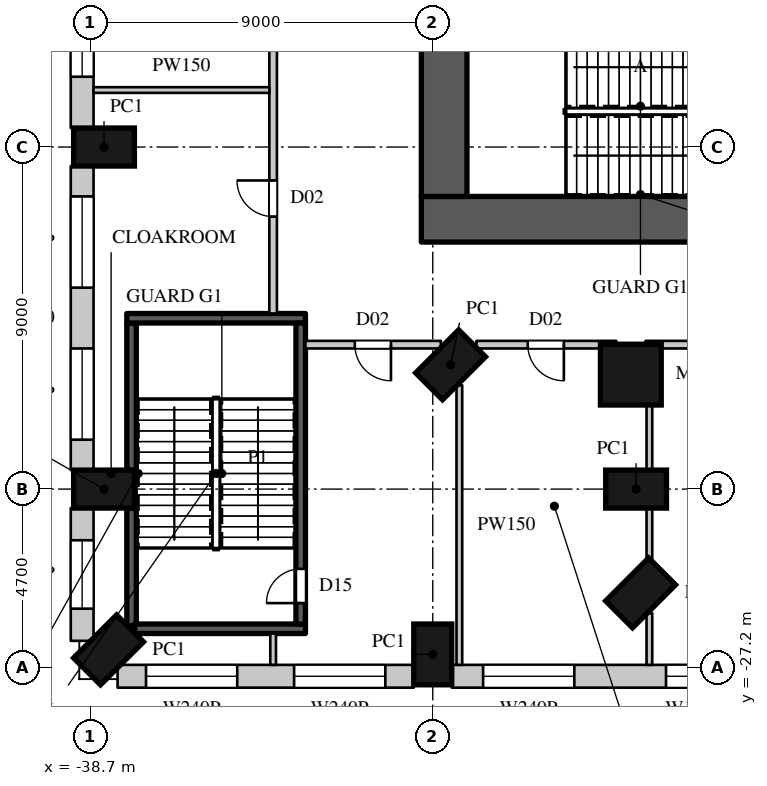
"""IFC4 building model, lengths in metres.
Left out: names, types, materials, properties, quantities, classifications, styles, units other than length and angle.
Written with IfcOpenShell. Run it as: python <this file> out.ifc"""

import sys

from ifc_helpers import new_model, si_unit, direction, frame, frame_2d, origin, origin_2d, place, context, subcontext, project, spatial, rectangle, circle, extrude, element, fill, save


model = new_model("IFC4")
c1 = context("Model", 3, precision=1e-05, world=origin(), true_north=direction((0.0, 1.0)))
c2 = subcontext(c1, "Body", "Model", "MODEL_VIEW")
j1 = project(units=[si_unit("LENGTHUNIT", "METRE"), si_unit("PLANEANGLEUNIT", "RADIAN")], contexts=[c1])
p1 = place(None, origin())
s1 = spatial("IfcSite", under=j1, at=p1, CompositionType="ELEMENT")
p2 = place(p1, origin())
s2 = spatial("IfcBuilding", under=s1, at=p2, CompositionType="ELEMENT")
p3 = place(p2, frame((0.0, 0.0, 19.0)))
s3 = spatial("IfcBuildingStorey", under=s2, at=p3, CompositionType="ELEMENT", Elevation=19.0)
p4 = place(p3, frame((-29.231, -19.231, 0.0), z_axis=(0.0, 0.0, 1.0), x_axis=(0.707106781187, -0.707106781187, 0.0)))
e1 = element("IfcColumn", 1, at=p4, inside=s3, PredefinedType="COLUMN", context=c2, shape_type="SweptSolid", body=[
    extrude(rectangle(XDim=1.0, YDim=1.6, at=origin_2d()), origin(), (0.0, 0.0, 1.0), 10.0),
])
p5 = place(p3, frame((-24.488, -19.488, 0.0), z_axis=(0.0, 0.0, 1.0), x_axis=(1.0, 0.0, 0.0)))
e2 = element("IfcColumn", 2, at=p5, inside=s3, PredefinedType="COLUMN", context=c2, shape_type="SweptSolid", body=[
    extrude(circle(Radius=0.8, at=origin_2d()), origin(), (0.0, 0.0, 1.0), 10.0),
])
for number, where, z_axis, x_axis in (
    (3, (-24.35, -22.5, 0.0), (0.0, 0.0, 1.0), (0.0, -1.0, 0.0)),
    (4, (-24.231, -25.231, 0.0), (0.0, 0.0, 1.0), (0.707, -0.707, 0.0)),
    (5, (-38.231, -26.731, 0.0), (0.0, 0.0, 1.0), (0.707, -0.707, 0.0)),
    (6, (-29.7, -26.85, 0.0), (0.0, 0.0, 1.0), (1.0, 0.0, 0.0)),
    (7, (-38.35, -13.5, 0.0), (0.0, 0.0, 1.0), (0.0, -1.0, 0.0)),
    (8, (-38.35, -22.5, 0.0), (0.0, 0.0, 1.0), (0.0, -1.0, 0.0)),
):
    element("IfcColumn", number, at=place(p3, frame(where, z_axis=z_axis, x_axis=x_axis)), inside=s3, PredefinedType="COLUMN", context=c2, shape_type="SweptSolid", body=[
        extrude(rectangle(XDim=1.0, YDim=1.6, at=origin_2d()), origin(), (0.0, 0.0, 1.0), 10.0),
    ])
p6 = place(p3, frame((-37.993, -27.425, 0.0), z_axis=(0.0, 0.0, 1.0), x_axis=(1.0, 0.0, 0.0)))
e9 = element("IfcWall", 9, at=p6, inside=s3, PredefinedType="ELEMENTEDWALL", context=c2, shape_type="SweptSolid", body=[
    extrude(rectangle(XDim=7.793, YDim=0.6, at=frame_2d((3.896, 0.0))), origin(), (0.0, 0.0, 1.0), 9.6),
])
p7 = place(p6, frame((0.748, 0.0, 3.0)))
e10 = element("IfcOpeningElement", 10, at=p7, cuts=e9, PredefinedType="OPENING", context=c2, shape_type="SweptSolid", body=[
    extrude(rectangle(XDim=2.4, YDim=2.4, at=frame_2d((1.2, 1.2))), frame((0.0, 0.31, 0.0), z_axis=(0.0, -1.0, 0.0), x_axis=(1.0, 0.0, 0.0)), (0.0, 0.0, 1.0), 0.62),
])
p8 = place(p6, frame((4.645, 0.0, 3.0)))
e11 = element("IfcOpeningElement", 11, at=p8, cuts=e9, PredefinedType="OPENING", context=c2, shape_type="SweptSolid", body=[
    extrude(rectangle(XDim=2.4, YDim=2.4, at=frame_2d((1.2, 1.2))), frame((0.0, 0.31, 0.0), z_axis=(0.0, -1.0, 0.0), x_axis=(1.0, 0.0, 0.0)), (0.0, 0.0, 1.0), 0.62),
])
p9 = place(p3, frame((-29.2, -27.425, 0.0), z_axis=(0.0, 0.0, 1.0), x_axis=(1.0, 0.0, 0.0)))
e12 = element("IfcWall", 12, at=p9, inside=s3, PredefinedType="ELEMENTEDWALL", context=c2, shape_type="SweptSolid", body=[
    extrude(rectangle(XDim=16.2, YDim=0.6, at=frame_2d((8.1, 0.0))), origin(), (0.0, 0.0, 1.0), 9.6),
])
p10 = place(p9, frame((0.825, 0.0, 3.0)))
e13 = element("IfcOpeningElement", 13, at=p10, cuts=e12, PredefinedType="OPENING", context=c2, shape_type="SweptSolid", body=[
    extrude(rectangle(XDim=2.4, YDim=2.4, at=frame_2d((1.2, 1.2))), frame((0.0, 0.31, 0.0), z_axis=(0.0, -1.0, 0.0), x_axis=(1.0, 0.0, 0.0)), (0.0, 0.0, 1.0), 0.62),
])
p11 = place(p9, frame((8.925, 0.0, 3.0)))
e14 = element("IfcOpeningElement", 14, at=p11, cuts=e12, PredefinedType="OPENING", context=c2, shape_type="SweptSolid", body=[
    extrude(rectangle(XDim=2.4, YDim=2.4, at=frame_2d((1.2, 1.2))), frame((0.0, 0.31, 0.0), z_axis=(0.0, -1.0, 0.0), x_axis=(1.0, 0.0, 0.0)), (0.0, 0.0, 1.0), 0.62),
])
p12 = place(p9, frame((12.975, 0.0, 3.0)))
e15 = element("IfcOpeningElement", 15, at=p12, cuts=e12, PredefinedType="OPENING", context=c2, shape_type="SweptSolid", body=[
    extrude(rectangle(XDim=2.4, YDim=2.4, at=frame_2d((1.2, 1.2))), frame((0.0, 0.31, 0.0), z_axis=(0.0, -1.0, 0.0), x_axis=(1.0, 0.0, 0.0)), (0.0, 0.0, 1.0), 0.62),
])
p13 = place(p9, frame((5.637, 0.0, 3.0)))
e16 = element("IfcOpeningElement", 16, at=p13, cuts=e12, PredefinedType="OPENING", context=c2, shape_type="SweptSolid", body=[
    extrude(rectangle(XDim=1.5, YDim=2.4, at=frame_2d((0.75, 1.2))), frame((0.0, 0.31, 0.0), z_axis=(0.0, -1.0, 0.0), x_axis=(1.0, 0.0, 0.0)), (0.0, 0.0, 1.0), 0.62),
])
p14 = place(p3, frame((-38.925, -5.0, 0.0), z_axis=(0.0, 0.0, 1.0), x_axis=(0.0, -1.0, 0.0)))
e17 = element("IfcWall", 17, at=p14, inside=s3, PredefinedType="ELEMENTEDWALL", context=c2, shape_type="SweptSolid", body=[
    extrude(rectangle(XDim=8.0, YDim=0.6, at=frame_2d((4.0, 0.0))), origin(), (0.0, 0.0, 1.0), 9.6),
])
p15 = place(p14, frame((0.8, 0.0, 3.0)))
e18 = element("IfcOpeningElement", 18, at=p15, cuts=e17, PredefinedType="OPENING", context=c2, shape_type="SweptSolid", body=[
    extrude(rectangle(XDim=2.4, YDim=2.4, at=frame_2d((1.2, 1.2))), frame((0.0, 0.31, 0.0), z_axis=(0.0, -1.0, 0.0), x_axis=(1.0, 0.0, 0.0)), (0.0, 0.0, 1.0), 0.62),
])
p16 = place(p14, frame((4.85, 0.0, 3.0)))
e19 = element("IfcOpeningElement", 19, at=p16, cuts=e17, PredefinedType="OPENING", context=c2, shape_type="SweptSolid", body=[
    extrude(rectangle(XDim=1.8, YDim=2.4, at=frame_2d((0.9, 1.2))), frame((0.0, 0.31, 0.0), z_axis=(0.0, -1.0, 0.0), x_axis=(1.0, 0.0, 0.0)), (0.0, 0.0, 1.0), 0.62),
])
p17 = place(p3, frame((-38.925, -14.0, 0.0), z_axis=(0.0, 0.0, 1.0), x_axis=(0.0, -1.0, 0.0)))
e20 = element("IfcWall", 20, at=p17, inside=s3, PredefinedType="ELEMENTEDWALL", context=c2, shape_type="SweptSolid", body=[
    extrude(rectangle(XDim=8.0, YDim=0.6, at=frame_2d((4.0, 0.0))), origin(), (0.0, 0.0, 1.0), 9.6),
])
p18 = place(p17, frame((0.8, 0.0, 3.0)))
e21 = element("IfcOpeningElement", 21, at=p18, cuts=e20, PredefinedType="OPENING", context=c2, shape_type="SweptSolid", body=[
    extrude(rectangle(XDim=2.4, YDim=2.4, at=frame_2d((1.2, 1.2))), frame((0.0, 0.31, 0.0), z_axis=(0.0, -1.0, 0.0), x_axis=(1.0, 0.0, 0.0)), (0.0, 0.0, 1.0), 0.62),
])
p19 = place(p17, frame((4.8, 0.0, 3.0)))
e22 = element("IfcOpeningElement", 22, at=p19, cuts=e20, PredefinedType="OPENING", context=c2, shape_type="SweptSolid", body=[
    extrude(rectangle(XDim=2.4, YDim=2.4, at=frame_2d((1.2, 1.2))), frame((0.0, 0.31, 0.0), z_axis=(0.0, -1.0, 0.0), x_axis=(1.0, 0.0, 0.0)), (0.0, 0.0, 1.0), 0.62),
])
p20 = place(p3, frame((-38.925, -23.0, 0.0), z_axis=(0.0, 0.0, 1.0), x_axis=(0.0, -1.0, 0.0)))
e23 = element("IfcWall", 23, at=p20, inside=s3, PredefinedType="ELEMENTEDWALL", context=c2, shape_type="SweptSolid", body=[
    extrude(rectangle(XDim=3.493, YDim=0.6, at=frame_2d((1.747, 0.0))), origin(), (0.0, 0.0, 1.0), 9.6),
])
p21 = place(p20, frame((0.846, 0.0, 3.0)))
e24 = element("IfcOpeningElement", 24, at=p21, cuts=e23, PredefinedType="OPENING", context=c2, shape_type="SweptSolid", body=[
    extrude(rectangle(XDim=1.8, YDim=2.4, at=frame_2d((0.9, 1.2))), frame((0.0, 0.31, 0.0), z_axis=(0.0, -1.0, 0.0), x_axis=(1.0, 0.0, 0.0)), (0.0, 0.0, 1.0), 0.62),
])
p22 = place(p3, frame((-30.0, -15.4, 0.0), z_axis=(0.0, 0.0, 1.0), x_axis=(1.0, 0.0, 0.0)))
e25 = element("IfcWall", 25, at=p22, inside=s3, PredefinedType="SHEAR", context=c2, shape_type="SweptSolid", body=[
    extrude(rectangle(XDim=16.0, YDim=1.2, at=frame_2d((8.0, 0.0))), origin(), (0.0, 0.0, 1.0), 10.0),
])
p23 = place(p3, frame((-29.4, -14.8, 0.0), z_axis=(0.0, 0.0, 1.0), x_axis=(0.0, 1.0, 0.0)))
e26 = element("IfcWall", 26, at=p23, inside=s3, PredefinedType="SHEAR", context=c2, shape_type="SweptSolid", body=[
    extrude(rectangle(XDim=4.6, YDim=1.2, at=frame_2d((2.3, 0.0))), origin(), (0.0, 0.0, 1.0), 10.0),
])
p24 = place(p3, frame((-33.9, -17.88, 0.0), z_axis=(0.0, 0.0, 1.0), x_axis=(0.0, 1.0, 0.0)))
e27 = element("IfcWall", 27, at=p24, inside=s3, PredefinedType="PARTITIONING", context=c2, shape_type="SweptSolid", body=[
    extrude(rectangle(XDim=35.76, YDim=0.2, at=frame_2d((17.88, 0.0))), origin(), (0.0, 0.0, 1.0), 9.598),
])
p25 = place(p24, frame((2.55, 0.0, 0.0)))
e28 = element("IfcOpeningElement", 28, at=p25, cuts=e27, PredefinedType="OPENING", context=c2, shape_type="SweptSolid", body=[
    extrude(rectangle(XDim=0.95, YDim=2.2, at=frame_2d((0.475, 1.1))), frame((0.0, 0.11, 0.0), z_axis=(0.0, -1.0, 0.0), x_axis=(1.0, 0.0, 0.0)), (0.0, 0.0, 1.0), 0.22),
])
p26 = place(p24, frame((12.9, 0.0, 0.0)))
e29 = element("IfcOpeningElement", 29, at=p26, cuts=e27, PredefinedType="OPENING", context=c2, shape_type="SweptSolid", body=[
    extrude(rectangle(XDim=0.95, YDim=2.2, at=frame_2d((0.475, 1.1))), frame((0.0, 0.11, 0.0), z_axis=(0.0, -1.0, 0.0), x_axis=(1.0, 0.0, 0.0)), (0.0, 0.0, 1.0), 0.22),
])
p27 = place(p24, frame((27.75, 0.0, 0.0)))
e30 = element("IfcOpeningElement", 30, at=p27, cuts=e27, PredefinedType="OPENING", context=c2, shape_type="SweptSolid", body=[
    extrude(rectangle(XDim=0.95, YDim=2.2, at=frame_2d((0.475, 1.1))), frame((0.0, 0.11, 0.0), z_axis=(0.0, -1.0, 0.0), x_axis=(1.0, 0.0, 0.0)), (0.0, 0.0, 1.0), 0.22),
])
p28 = place(p3, frame((-33.05, -18.7, 0.0), z_axis=(0.0, 0.0, 1.0), x_axis=(1.0, 0.0, 0.0)))
e31 = element("IfcWall", 31, at=p28, inside=s3, PredefinedType="PARTITIONING", context=c2, shape_type="SweptSolid", body=[
    extrude(rectangle(XDim=3.563, YDim=0.2, at=frame_2d((1.781, 0.0))), origin(), (0.0, 0.0, 1.0), 9.598),
])
p29 = place(p28, frame((1.3, 0.0, 0.0)))
e32 = element("IfcOpeningElement", 32, at=p29, cuts=e31, PredefinedType="OPENING", context=c2, shape_type="SweptSolid", body=[
    extrude(rectangle(XDim=0.95, YDim=2.2, at=frame_2d((0.475, 1.1))), frame((0.0, 0.11, 0.0), z_axis=(0.0, -1.0, 0.0), x_axis=(1.0, 0.0, 0.0)), (0.0, 0.0, 1.0), 0.22),
])
p30 = place(p3, frame((-28.55, -18.7, 0.0), z_axis=(0.0, 0.0, 1.0), x_axis=(1.0, 0.0, 0.0)))
e33 = element("IfcWall", 33, at=p30, inside=s3, PredefinedType="PARTITIONING", context=c2, shape_type="SweptSolid", body=[
    extrude(rectangle(XDim=3.679, YDim=0.2, at=frame_2d((1.839, 0.0))), origin(), (0.0, 0.0, 1.0), 9.598),
])
p31 = place(p30, frame((1.35, 0.0, 0.0)))
e34 = element("IfcOpeningElement", 34, at=p31, cuts=e33, PredefinedType="OPENING", context=c2, shape_type="SweptSolid", body=[
    extrude(rectangle(XDim=0.95, YDim=2.2, at=frame_2d((0.475, 1.1))), frame((0.0, 0.11, 0.0), z_axis=(0.0, -1.0, 0.0), x_axis=(1.0, 0.0, 0.0)), (0.0, 0.0, 1.0), 0.22),
])
p32 = place(p3, frame((-24.105, -18.7, 0.0), z_axis=(0.0, 0.0, 1.0), x_axis=(1.0, 0.0, 0.0)))
e35 = element("IfcWall", 35, at=p32, inside=s3, PredefinedType="PARTITIONING", context=c2, shape_type="SweptSolid", body=[
    extrude(rectangle(XDim=13.505, YDim=0.2, at=frame_2d((6.752, 0.0))), origin(), (0.0, 0.0, 1.0), 9.598),
])
p33 = place(p32, frame((4.0, 0.0, 0.0)))
e36 = element("IfcOpeningElement", 36, at=p33, cuts=e35, PredefinedType="OPENING", context=c2, shape_type="SweptSolid", body=[
    extrude(rectangle(XDim=0.95, YDim=2.2, at=frame_2d((0.475, 1.1))), frame((0.0, 0.11, 0.0), z_axis=(0.0, -1.0, 0.0), x_axis=(1.0, 0.0, 0.0)), (0.0, 0.0, 1.0), 0.22),
])
p34 = place(p32, frame((9.75, 0.0, 0.0)))
e37 = element("IfcOpeningElement", 37, at=p34, cuts=e35, PredefinedType="OPENING", context=c2, shape_type="SweptSolid", body=[
    extrude(rectangle(XDim=0.95, YDim=2.2, at=frame_2d((0.475, 1.1))), frame((0.0, 0.11, 0.0), z_axis=(0.0, -1.0, 0.0), x_axis=(1.0, 0.0, 0.0)), (0.0, 0.0, 1.0), 0.22),
])
p35 = place(p3, frame((-38.625, -12.0, 0.0), z_axis=(0.0, 0.0, 1.0), x_axis=(1.0, 0.0, 0.0)))
e38 = element("IfcWall", 38, at=p35, inside=s3, PredefinedType="PARTITIONING", context=c2, shape_type="SweptSolid", body=[
    extrude(rectangle(XDim=4.625, YDim=0.15, at=frame_2d((2.312, 0.0))), origin(), (0.0, 0.0, 1.0), 9.598),
])
p36 = place(p3, frame((-33.9, -27.125, 0.0), z_axis=(0.0, 0.0, 1.0), x_axis=(0.0, 1.0, 0.0)))
e39 = element("IfcWall", 39, at=p36, inside=s3, PredefinedType="PARTITIONING", context=c2, shape_type="SweptSolid", body=[
    extrude(rectangle(XDim=0.825, YDim=0.15, at=frame_2d((0.413, 0.0))), origin(), (0.0, 0.0, 1.0), 9.598),
])
p37 = place(p3, frame((-29.0, -27.125, 0.0), z_axis=(0.0, 0.0, 1.0), x_axis=(0.0, 1.0, 0.0)))
e40 = element("IfcWall", 40, at=p37, inside=s3, PredefinedType="PARTITIONING", context=c2, shape_type="SweptSolid", body=[
    extrude(rectangle(XDim=7.358, YDim=0.15, at=frame_2d((3.679, 0.0))), origin(), (0.0, 0.0, 1.0), 9.598),
])
p38 = place(p3, frame((-24.0, -27.125, 0.0), z_axis=(0.0, 0.0, 1.0), x_axis=(0.0, 1.0, 0.0)))
e41 = element("IfcWall", 41, at=p38, inside=s3, PredefinedType="PARTITIONING", context=c2, shape_type="SweptSolid", body=[
    extrude(rectangle(XDim=1.358, YDim=0.15, at=frame_2d((0.679, 0.0))), origin(), (0.0, 0.0, 1.0), 9.598),
])
p39 = place(p3, frame((-24.0, -24.32, 0.0), z_axis=(0.0, 0.0, 1.0), x_axis=(0.0, 1.0, 0.0)))
e42 = element("IfcWall", 42, at=p39, inside=s3, PredefinedType="PARTITIONING", context=c2, shape_type="SweptSolid", body=[
    extrude(rectangle(XDim=1.32, YDim=0.15, at=frame_2d((0.66, 0.0))), origin(), (0.0, 0.0, 1.0), 9.598),
])
p40 = place(p3, frame((-24.0, -22.0, 0.0), z_axis=(0.0, 0.0, 1.0), x_axis=(0.0, 1.0, 0.0)))
e43 = element("IfcWall", 43, at=p40, inside=s3, PredefinedType="PARTITIONING", context=c2, shape_type="SweptSolid", body=[
    extrude(rectangle(XDim=1.843, YDim=0.15, at=frame_2d((0.921, 0.0))), origin(), (0.0, 0.0, 1.0), 9.598),
])
p41 = place(p3, frame((-37.625, -26.095, 0.0), z_axis=(0.0, 0.0, 1.0), x_axis=(0.0, 1.0, 0.0)))
e44 = element("IfcWall", 44, at=p41, inside=s3, PredefinedType="SHEAR", context=c2, shape_type="SweptSolid", body=[
    extrude(rectangle(XDim=3.095, YDim=0.25, at=frame_2d((1.548, 0.0))), origin(), (0.0, 0.0, 1.0), 9.6),
])
p42 = place(p3, frame((-37.625, -22.0, 0.0), z_axis=(0.0, 0.0, 1.0), x_axis=(0.0, 1.0, 0.0)))
e45 = element("IfcWall", 45, at=p42, inside=s3, PredefinedType="SHEAR", context=c2, shape_type="SweptSolid", body=[
    extrude(rectangle(XDim=3.87, YDim=0.25, at=frame_2d((1.935, 0.0))), origin(), (0.0, 0.0, 1.0), 9.6),
])
p43 = place(p3, frame((-37.545, -26.175, 0.0), z_axis=(0.0, 0.0, 1.0), x_axis=(1.0, 0.0, 0.0)))
e46 = element("IfcWall", 46, at=p43, inside=s3, PredefinedType="SHEAR", context=c2, shape_type="SweptSolid", body=[
    extrude(rectangle(XDim=4.495, YDim=0.25, at=frame_2d((2.248, 0.0))), origin(), (0.0, 0.0, 1.0), 9.6),
])
p44 = place(p3, frame((-37.75, -18.005, 0.0), z_axis=(0.0, 0.0, 1.0), x_axis=(1.0, 0.0, 0.0)))
e47 = element("IfcWall", 47, at=p44, inside=s3, PredefinedType="SHEAR", context=c2, shape_type="SweptSolid", body=[
    extrude(rectangle(XDim=4.7, YDim=0.25, at=frame_2d((2.35, 0.0))), origin(), (0.0, 0.0, 1.0), 9.6),
])
p45 = place(p3, frame((-33.175, -26.05, 0.0), z_axis=(0.0, 0.0, 1.0), x_axis=(0.0, 1.0, 0.0)))
e48 = element("IfcWall", 48, at=p45, inside=s3, PredefinedType="SHEAR", context=c2, shape_type="SweptSolid", body=[
    extrude(rectangle(XDim=7.92, YDim=0.25, at=frame_2d((3.96, 0.0))), origin(), (0.0, 0.0, 1.0), 9.6),
])
p46 = place(p45, frame((0.55, 0.0, 0.0)))
e49 = element("IfcOpeningElement", 49, at=p46, cuts=e48, PredefinedType="OPENING", context=c2, shape_type="SweptSolid", body=[
    extrude(rectangle(XDim=0.9, YDim=2.2, at=frame_2d((0.45, 1.1))), frame((0.0, 0.135, 0.0), z_axis=(0.0, -1.0, 0.0), x_axis=(1.0, 0.0, 0.0)), (0.0, 0.0, 1.0), 0.27),
])
p47 = place(p7, origin())
e50 = element("IfcWindow", 50, at=p47, inside=s3, PartitioningType="SINGLE_PANEL", PredefinedType="WINDOW", context=c2, shape_type="SweptSolid", body=[
    extrude(rectangle(XDim=2.4, YDim=2.4, at=frame_2d((1.2, 1.2))), frame((0.0, 0.06, 0.0), z_axis=(0.0, -1.0, 0.0), x_axis=(1.0, 0.0, 0.0)), (0.0, 0.0, 1.0), 0.06),
])
fill(e10, e50)
p48 = place(p8, origin())
e51 = element("IfcWindow", 51, at=p48, inside=s3, PartitioningType="SINGLE_PANEL", PredefinedType="WINDOW", context=c2, shape_type="SweptSolid", body=[
    extrude(rectangle(XDim=2.4, YDim=2.4, at=frame_2d((1.2, 1.2))), frame((0.0, 0.06, 0.0), z_axis=(0.0, -1.0, 0.0), x_axis=(1.0, 0.0, 0.0)), (0.0, 0.0, 1.0), 0.06),
])
fill(e11, e51)
p49 = place(p10, origin())
e52 = element("IfcWindow", 52, at=p49, inside=s3, PartitioningType="SINGLE_PANEL", PredefinedType="WINDOW", context=c2, shape_type="SweptSolid", body=[
    extrude(rectangle(XDim=2.4, YDim=2.4, at=frame_2d((1.2, 1.2))), frame((0.0, 0.06, 0.0), z_axis=(0.0, -1.0, 0.0), x_axis=(1.0, 0.0, 0.0)), (0.0, 0.0, 1.0), 0.06),
])
fill(e13, e52)
p50 = place(p18, origin())
e53 = element("IfcWindow", 53, at=p50, inside=s3, PartitioningType="SINGLE_PANEL", PredefinedType="WINDOW", context=c2, shape_type="SweptSolid", body=[
    extrude(rectangle(XDim=2.4, YDim=2.4, at=frame_2d((1.2, 1.2))), frame((0.0, 0.06, 0.0), z_axis=(0.0, -1.0, 0.0), x_axis=(1.0, 0.0, 0.0)), (0.0, 0.0, 1.0), 0.06),
])
fill(e21, e53)
p51 = place(p19, origin())
e54 = element("IfcWindow", 54, at=p51, inside=s3, PartitioningType="SINGLE_PANEL", PredefinedType="WINDOW", context=c2, shape_type="SweptSolid", body=[
    extrude(rectangle(XDim=2.4, YDim=2.4, at=frame_2d((1.2, 1.2))), frame((0.0, 0.06, 0.0), z_axis=(0.0, -1.0, 0.0), x_axis=(1.0, 0.0, 0.0)), (0.0, 0.0, 1.0), 0.06),
])
fill(e22, e54)
p52 = place(p21, origin())
e55 = element("IfcWindow", 55, at=p52, inside=s3, PartitioningType="SINGLE_PANEL", PredefinedType="WINDOW", context=c2, shape_type="SweptSolid", body=[
    extrude(rectangle(XDim=1.8, YDim=2.4, at=frame_2d((0.9, 1.2))), frame((0.0, 0.06, 0.0), z_axis=(0.0, -1.0, 0.0), x_axis=(1.0, 0.0, 0.0)), (0.0, 0.0, 1.0), 0.06),
])
fill(e24, e55)
p53 = place(p29, origin())
e56 = element("IfcDoor", 56, at=p53, inside=s3, OperationType="SINGLE_SWING_LEFT", PredefinedType="DOOR", context=c2, shape_type="SweptSolid", body=[
    extrude(rectangle(XDim=0.95, YDim=2.2, at=frame_2d((0.475, 1.1))), frame((0.0, 0.025, 0.0), z_axis=(0.0, -1.0, 0.0), x_axis=(1.0, 0.0, 0.0)), (0.0, 0.0, 1.0), 0.05),
])
fill(e32, e56)
p54 = place(p31, origin())
e57 = element("IfcDoor", 57, at=p54, inside=s3, OperationType="SINGLE_SWING_LEFT", PredefinedType="DOOR", context=c2, shape_type="SweptSolid", body=[
    extrude(rectangle(XDim=0.95, YDim=2.2, at=frame_2d((0.475, 1.1))), frame((0.0, 0.025, 0.0), z_axis=(0.0, -1.0, 0.0), x_axis=(1.0, 0.0, 0.0)), (0.0, 0.0, 1.0), 0.05),
])
fill(e34, e57)
p55 = place(p25, origin())
e58 = element("IfcDoor", 58, at=p55, inside=s3, OperationType="SINGLE_SWING_RIGHT", PredefinedType="DOOR", context=c2, shape_type="SweptSolid", body=[
    extrude(rectangle(XDim=0.95, YDim=2.2, at=frame_2d((0.475, 1.1))), frame((0.0, 0.025, 0.0), z_axis=(0.0, -1.0, 0.0), x_axis=(1.0, 0.0, 0.0)), (0.0, 0.0, 1.0), 0.05),
])
fill(e28, e58)
p56 = place(p46, origin())
e59 = element("IfcDoor", 59, at=p56, inside=s3, OperationType="SINGLE_SWING_LEFT", PredefinedType="DOOR", context=c2, shape_type="SweptSolid", body=[
    extrude(rectangle(XDim=0.9, YDim=2.2, at=frame_2d((0.45, 1.1))), frame((0.0, 0.025, 0.0), z_axis=(0.0, -1.0, 0.0), x_axis=(1.0, 0.0, 0.0)), (0.0, 0.0, 1.0), 0.05),
])
fill(e49, e59)
p57 = place(p13, origin())
e60 = element("IfcWindow", 60, at=p57, inside=s3, PartitioningType="SINGLE_PANEL", PredefinedType="WINDOW", context=c2, shape_type="SweptSolid", body=[
    extrude(rectangle(XDim=1.5, YDim=2.4, at=frame_2d((0.75, 1.2))), frame((0.0, 0.06, 0.0), z_axis=(0.0, -1.0, 0.0), x_axis=(1.0, 0.0, 0.0)), (0.0, 0.0, 1.0), 0.06),
])
fill(e16, e60)
p58 = place(p16, origin())
e61 = element("IfcWindow", 61, at=p58, inside=s3, PartitioningType="SINGLE_PANEL", PredefinedType="WINDOW", context=c2, shape_type="SweptSolid", body=[
    extrude(rectangle(XDim=1.8, YDim=2.4, at=frame_2d((0.9, 1.2))), frame((0.0, 0.06, 0.0), z_axis=(0.0, -1.0, 0.0), x_axis=(1.0, 0.0, 0.0)), (0.0, 0.0, 1.0), 0.06),
])
fill(e19, e61)
save(model, sys.argv[1])
